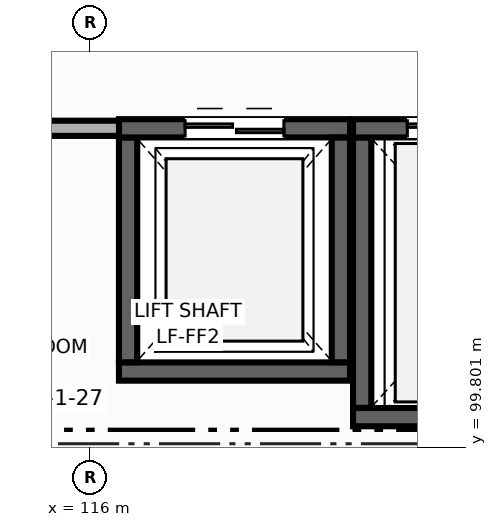
"""IFC4 building model, lengths in metres.
Left out: names, types, materials, properties, quantities, classifications, styles, units other than length and angle.
Written with IfcOpenShell. Run it as: python <this file> out.ifc"""

import sys

from ifc_helpers import new_model, si_unit, direction, frame, frame_2d, origin, place, context, subcontext, project, spatial, rectangle, extrude, element, fill, save


model = new_model("IFC4")
c1 = context("Model", 3, precision=1e-05, world=origin(), true_north=direction((0.0, 1.0)))
c2 = subcontext(c1, "Body", "Model", "MODEL_VIEW")
j1 = project(units=[si_unit("LENGTHUNIT", "METRE"), si_unit("PLANEANGLEUNIT", "RADIAN")], contexts=[c1])
p1 = place(None, origin())
s1 = spatial("IfcSite", under=j1, at=p1, CompositionType="ELEMENT")
p2 = place(p1, origin())
s2 = spatial("IfcBuilding", under=s1, at=p2, CompositionType="ELEMENT")
p3 = place(p2, frame((0.0, 0.0, 14.4)))
s3 = spatial("IfcBuildingStorey", under=s2, at=p3, CompositionType="ELEMENT", Elevation=14.4)
p4 = place(p3, frame((119.42, 100.8, 0.0), z_axis=(0.0, 0.0, 1.0), x_axis=(-1.0, 0.0, 0.0)))
e1 = element("IfcWall", 1, at=p4, inside=s3, PredefinedType="SHEAR", context=c2, shape_type="SweptSolid", body=[
    extrude(rectangle(XDim=3.04, YDim=0.24, at=frame_2d((1.52, 0.0))), origin(), (0.0, 0.0, 1.0), 4.26),
])
p5 = place(p3, frame((116.5, 100.922, 0.0), z_axis=(0.0, 0.0, 1.0), x_axis=(0.0, 1.0, 0.0)))
e2 = element("IfcWall", 2, at=p5, inside=s3, PredefinedType="SHEAR", context=c2, shape_type="SweptSolid", body=[
    extrude(rectangle(XDim=2.958, YDim=0.24, at=frame_2d((1.479, 0.0))), origin(), (0.0, 0.0, 1.0), 4.26),
])
p6 = place(p3, frame((116.38, 104.0, 0.0), z_axis=(0.0, 0.0, 1.0), x_axis=(1.0, 0.0, 0.0)))
e3 = element("IfcWall", 3, at=p6, inside=s3, PredefinedType="SHEAR", context=c2, shape_type="SweptSolid", body=[
    extrude(rectangle(XDim=3.04, YDim=0.24, at=frame_2d((1.52, 0.0))), origin(), (0.0, 0.0, 1.0), 4.26),
])
p7 = place(p6, frame((0.87, 0.0, 0.0)))
e4 = element("IfcOpeningElement", 4, at=p7, cuts=e3, PredefinedType="OPENING", context=c2, shape_type="SweptSolid", body=[
    extrude(rectangle(XDim=1.3, YDim=2.15, at=frame_2d((0.65, 1.075))), frame((0.0, 0.13, 0.0), z_axis=(0.0, -1.0, 0.0), x_axis=(1.0, 0.0, 0.0)), (0.0, 0.0, 1.0), 0.26),
])
p8 = place(p3, frame((119.3, 103.878, 0.0), z_axis=(0.0, 0.0, 1.0), x_axis=(0.0, -1.0, 0.0)))
e5 = element("IfcWall", 5, at=p8, inside=s3, PredefinedType="SHEAR", context=c2, shape_type="SweptSolid", body=[
    extrude(rectangle(XDim=2.956, YDim=0.24, at=frame_2d((1.478, 0.0))), origin(), (0.0, 0.0, 1.0), 4.26),
])
p9 = place(p3, frame((123.088, 100.2, 0.0), z_axis=(0.0, 0.0, 1.0), x_axis=(-1.0, 0.0, 0.0)))
e6 = element("IfcWall", 6, at=p9, inside=s3, PredefinedType="SHEAR", context=c2, shape_type="SweptSolid", body=[
    extrude(rectangle(XDim=3.628, YDim=0.24, at=frame_2d((1.814, 0.0))), origin(), (0.0, 0.0, 1.0), 4.26),
])
p10 = place(p3, frame((119.58, 100.322, 0.0), z_axis=(0.0, 0.0, 1.0), x_axis=(0.0, 1.0, 0.0)))
e7 = element("IfcWall", 7, at=p10, inside=s3, PredefinedType="SHEAR", context=c2, shape_type="SweptSolid", body=[
    extrude(rectangle(XDim=3.558, YDim=0.24, at=frame_2d((1.779, 0.0))), origin(), (0.0, 0.0, 1.0), 4.26),
])
p11 = place(p3, frame((119.46, 104.0, 0.0), z_axis=(0.0, 0.0, 1.0), x_axis=(1.0, 0.0, 0.0)))
e8 = element("IfcWall", 8, at=p11, inside=s3, PredefinedType="SHEAR", context=c2, shape_type="SweptSolid", body=[
    extrude(rectangle(XDim=3.628, YDim=0.24, at=frame_2d((1.814, 0.0))), origin(), (0.0, 0.0, 1.0), 4.26),
])
p12 = place(p11, frame((0.714, 0.0, 0.0)))
e9 = element("IfcOpeningElement", 9, at=p12, cuts=e8, PredefinedType="OPENING", context=c2, shape_type="SweptSolid", body=[
    extrude(rectangle(XDim=2.2, YDim=2.5, at=frame_2d((1.1, 1.25))), frame((0.0, 0.13, 0.0), z_axis=(0.0, -1.0, 0.0), x_axis=(1.0, 0.0, 0.0)), (0.0, 0.0, 1.0), 0.26),
])
p13 = place(p3, frame((116.38, 104.0, 0.0), z_axis=(0.0, 0.0, 1.0), x_axis=(-1.0, 0.0, 0.0)))
e10 = element("IfcWall", 10, at=p13, inside=s3, PredefinedType="PARTITIONING", context=c2, shape_type="SweptSolid", body=[
    extrude(rectangle(XDim=1.88, YDim=0.2, at=frame_2d((0.94, 0.0))), origin(), (0.0, 0.0, 1.0), 4.26),
])
p14 = place(p7, origin())
e11 = element("IfcDoor", 11, at=p14, inside=s3, OperationType="DOUBLE_DOOR_SLIDING", PredefinedType="DOOR", context=c2, shape_type="SweptSolid", body=[
    extrude(rectangle(XDim=1.3, YDim=2.15, at=frame_2d((0.65, 1.075))), frame((0.0, 0.025, 0.0), z_axis=(0.0, -1.0, 0.0), x_axis=(1.0, 0.0, 0.0)), (0.0, 0.0, 1.0), 0.05),
])
fill(e4, e11)
p15 = place(p12, origin())
e12 = element("IfcDoor", 12, at=p15, inside=s3, OperationType="DOUBLE_DOOR_SLIDING", PredefinedType="DOOR", context=c2, shape_type="SweptSolid", body=[
    extrude(rectangle(XDim=2.2, YDim=2.5, at=frame_2d((1.1, 1.25))), frame((0.0, 0.025, 0.0), z_axis=(0.0, -1.0, 0.0), x_axis=(1.0, 0.0, 0.0)), (0.0, 0.0, 1.0), 0.05),
])
fill(e9, e12)
save(model, sys.argv[1])
